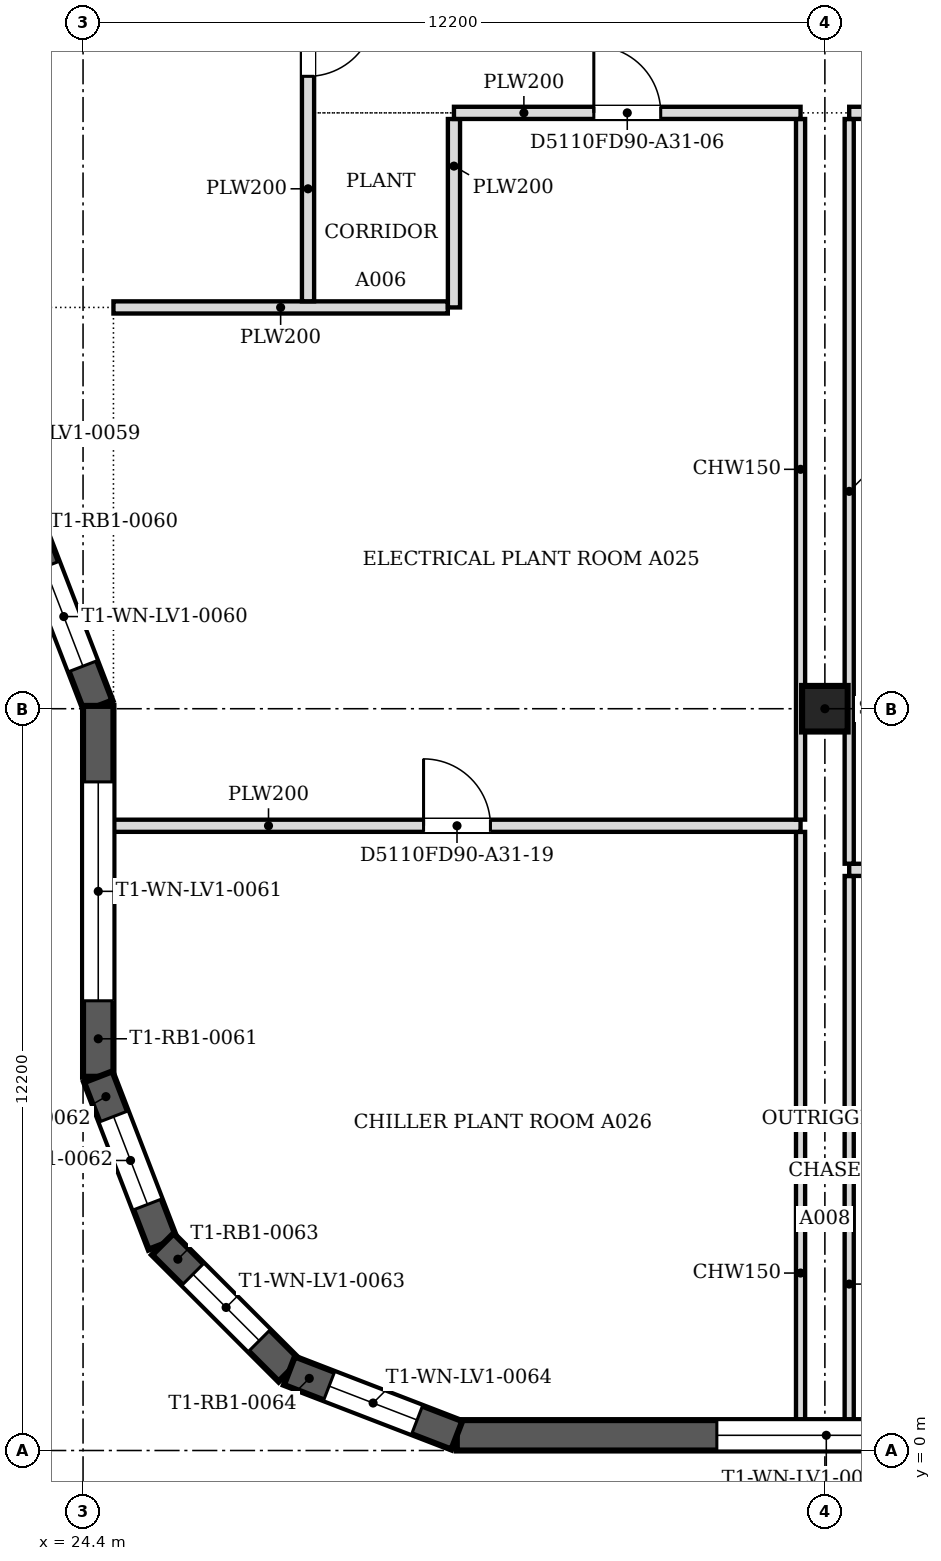
"""IFC4 building model, lengths in metres.
Left out: names, types, materials, properties, quantities, classifications, styles, units other than length and angle.
Written with IfcOpenShell. Run it as: python <this file> out.ifc"""

import sys

from ifc_helpers import new_model, si_unit, direction, frame, frame_2d, origin, origin_2d, place, context, subcontext, project, spatial, polyline, rectangle, outline, extrude, faceted_brep, source, transform, mapped, element, fill, save


model = new_model("IFC4")
c1 = context("Model", 3, precision=1e-05, world=origin(), true_north=direction((0.0, 1.0)))
c2 = subcontext(c1, "Body", "Model", "MODEL_VIEW")
j1 = project(units=[si_unit("LENGTHUNIT", "METRE"), si_unit("PLANEANGLEUNIT", "RADIAN")], contexts=[c1])
p1 = place(None, origin())
s1 = spatial("IfcSite", under=j1, at=p1, CompositionType="ELEMENT")
p2 = place(p1, origin())
s2 = spatial("IfcBuilding", under=s1, at=p2, CompositionType="ELEMENT")
p3 = place(p2, frame((0.0, 0.0, 150.6)))
s3 = spatial("IfcBuildingStorey", under=s2, at=p3, CompositionType="ELEMENT", Elevation=150.6)
p4 = place(p3, frame((36.6, 12.2, 0.0), z_axis=(0.0, 0.0, 1.0), x_axis=(1.0, 0.0, 0.0)))
e1 = element("IfcColumn", 1, at=p4, inside=s3, PredefinedType="COLUMN", context=c2, shape_type="SweptSolid", body=[
    extrude(rectangle(XDim=0.75, YDim=0.75, at=origin_2d()), origin(), (0.0, 0.0, 1.0), 4.6),
])
m1 = source(origin(), c2, "Body", "Brep", [
    faceted_brep([(0.0, -0.25, 0.0), (12.154, -0.25, 0.0), (12.154, -0.25, 4.8), (0.0, -0.25, 4.8), (0.047, 0.25, 4.8), (12.154, 0.25, 4.8), (12.154, 0.25, 0.0), (0.047, 0.25, 0.0), (0.0, 0.0, 0.0), (0.0, 0.0, 4.8)], [[[0, 1, 2, 3]], [[4, 5, 6, 7]], [[7, 6, 1, 0, 8]], [[5, 4, 9, 3, 2]], [[8, 0, 3, 9]], [[7, 8, 9, 4]], [[1, 6, 5, 2]]]),
])
p5 = place(p3, frame((30.547, 0.25, 0.0), z_axis=(0.0, 0.0, 1.0), x_axis=(1.0, 0.0, 0.0)))
e2 = element("IfcWall", 2, at=p5, inside=s3, PredefinedType="SOLIDWALL", context=c2, shape_type="MappedRepresentation", body=[
    mapped(m1, transform((0.0, 0.0, 0.0), scale=1.0)),
])
m2 = source(origin(), c2, "Body", "SweptSolid", [
    extrude(outline(polyline([(4.277, 0.8), (7.877, 0.8), (7.877, 4.0), (4.277, 4.0), (4.277, 0.8)])), frame((0.0, 0.26, 0.0), z_axis=(0.0, -1.0, 0.0), x_axis=(1.0, 0.0, 0.0)), (0.0, 0.0, 1.0), 0.52),
])
p6 = place(p5, origin())
e3 = element("IfcOpeningElement", 3, at=p6, cuts=e2, PredefinedType="OPENING", context=c2, shape_type="MappedRepresentation", body=[
    mapped(m2, transform((0.0, 0.0, 0.0), scale=1.0)),
])
m3 = source(origin(), c2, "Body", "Brep", [
    faceted_brep([(0.053, -0.25, 0.0), (3.103, -0.25, 0.0), (3.103, -0.25, 4.8), (0.053, -0.25, 4.8), (0.0, 0.25, 4.8), (3.149, 0.25, 4.8), (3.149, 0.25, 0.0), (0.0, 0.25, 0.0), (3.149, -0.0, 0.0), (0.0, 0.0, 0.0), (3.149, -0.0, 4.8), (0.0, 0.0, 4.8)], [[[0, 1, 2, 3]], [[4, 5, 6, 7]], [[7, 6, 8, 1, 0, 9]], [[6, 5, 10, 8]], [[5, 4, 11, 3, 2, 10]], [[4, 7, 9, 11]], [[9, 0, 3, 11]], [[1, 8, 10, 2]]]),
])
p7 = place(p3, frame((23.517, 15.185, 0.0), z_axis=(0.0, 0.0, 1.0), x_axis=(0.359841220347, -0.933013556246, 0.0)))
e4 = element("IfcWall", 4, at=p7, inside=s3, PredefinedType="SOLIDWALL", context=c2, shape_type="MappedRepresentation", body=[
    mapped(m3, transform((0.0, 0.0, 0.0), scale=1.0)),
])
m4 = source(origin(), c2, "Body", "SweptSolid", [
    extrude(outline(polyline([(0.7, 0.8), (2.449, 0.8), (2.449, 4.0), (0.7, 4.0), (0.7, 0.8)])), frame((0.0, 0.26, 0.0), z_axis=(0.0, -1.0, 0.0), x_axis=(1.0, 0.0, 0.0)), (0.0, 0.0, 1.0), 0.52),
])
p8 = place(p7, origin())
e5 = element("IfcOpeningElement", 5, at=p8, cuts=e4, PredefinedType="OPENING", context=c2, shape_type="MappedRepresentation", body=[
    mapped(m4, transform((0.0, 0.0, 0.0), scale=1.0)),
])
m5 = source(origin(), c2, "Body", "Brep", [
    faceted_brep([(0.047, -0.25, 0.0), (6.1, -0.25, 0.0), (6.1, -0.25, 4.8), (0.047, -0.25, 4.8), (0.0, 0.25, 4.8), (6.053, 0.25, 4.8), (6.053, 0.25, 0.0), (0.0, 0.25, 0.0), (6.1, -0.0, 0.0), (0.0, 0.0, 0.0), (6.1, -0.0, 4.8), (0.0, 0.0, 4.8)], [[[0, 1, 2, 3]], [[4, 5, 6, 7]], [[7, 6, 8, 1, 0, 9]], [[10, 2, 1, 8]], [[5, 4, 11, 3, 2, 10]], [[4, 7, 9, 11]], [[9, 0, 3, 11]], [[8, 6, 5, 10]]]),
])
p9 = place(p3, frame((24.65, 12.247, 0.0), z_axis=(0.0, 0.0, 1.0), x_axis=(0.0, -1.0, 0.0)))
e6 = element("IfcWall", 6, at=p9, inside=s3, PredefinedType="SOLIDWALL", context=c2, shape_type="MappedRepresentation", body=[
    mapped(m5, transform((0.0, 0.0, 0.0), scale=1.0)),
])
m6 = source(origin(), c2, "Body", "SweptSolid", [
    extrude(outline(polyline([(1.25, 0.8), (4.85, 0.8), (4.85, 4.0), (1.25, 4.0), (1.25, 0.8)])), frame((0.0, 0.26, 0.0), z_axis=(0.0, -1.0, 0.0), x_axis=(1.0, 0.0, 0.0)), (0.0, 0.0, 1.0), 0.52),
])
p10 = place(p9, origin())
e7 = element("IfcOpeningElement", 7, at=p10, cuts=e6, PredefinedType="OPENING", context=c2, shape_type="MappedRepresentation", body=[
    mapped(m6, transform((0.0, 0.0, 0.0), scale=1.0)),
])
m7 = source(origin(), c2, "Body", "Brep", [
    faceted_brep([(0.0, -0.25, 0.0), (2.95, -0.25, 0.0), (2.95, -0.25, 4.8), (0.0, -0.25, 4.8), (0.047, 0.25, 4.8), (2.898, 0.25, 4.8), (2.898, 0.25, 0.0), (0.047, 0.25, 0.0), (2.95, 0.0, 0.0), (0.0, 0.0, 0.0), (2.95, 0.0, 4.8), (0.0, 0.0, 4.8)], [[[0, 1, 2, 3]], [[4, 5, 6, 7]], [[7, 6, 8, 1, 0, 9]], [[10, 2, 1, 8]], [[5, 4, 11, 3, 2, 10]], [[9, 0, 3, 11]], [[7, 9, 11, 4]], [[8, 6, 5, 10]]]),
])
p11 = place(p3, frame((24.65, 6.146, 0.0), z_axis=(0.0, 0.0, 1.0), x_axis=(0.359949242603, -0.932971887438, 0.0)))
e8 = element("IfcWall", 8, at=p11, inside=s3, PredefinedType="SOLIDWALL", context=c2, shape_type="MappedRepresentation", body=[
    mapped(m7, transform((0.0, 0.0, 0.0), scale=1.0)),
])
m8 = source(origin(), c2, "Body", "SweptSolid", [
    extrude(outline(polyline([(0.7, 0.8), (2.25, 0.8), (2.25, 4.0), (0.7, 4.0), (0.7, 0.8)])), frame((0.0, 0.26, 0.0), z_axis=(0.0, -1.0, 0.0), x_axis=(1.0, 0.0, 0.0)), (0.0, 0.0, 1.0), 0.52),
])
p12 = place(p11, origin())
e9 = element("IfcOpeningElement", 9, at=p12, cuts=e8, PredefinedType="OPENING", context=c2, shape_type="MappedRepresentation", body=[
    mapped(m8, transform((0.0, 0.0, 0.0), scale=1.0)),
])
m9 = source(origin(), c2, "Body", "Brep", [
    faceted_brep([(0.0, -0.25, 0.0), (2.944, -0.25, 0.0), (2.944, -0.25, 4.8), (0.0, -0.25, 4.8), (0.053, 0.25, 4.8), (2.891, 0.25, 4.8), (2.891, 0.25, 0.0), (0.053, 0.25, 0.0), (2.944, 0.0, 0.0), (0.0, 0.0, 0.0), (2.944, 0.0, 4.8), (0.0, 0.0, 4.8)], [[[0, 1, 2, 3]], [[4, 5, 6, 7]], [[7, 6, 8, 1, 0, 9]], [[10, 2, 1, 8]], [[5, 4, 11, 3, 2, 10]], [[9, 0, 3, 11]], [[7, 9, 11, 4]], [[8, 6, 5, 10]]]),
])
p13 = place(p3, frame((25.712, 3.394, 0.0), z_axis=(0.0, 0.0, 1.0), x_axis=(0.707106781187, -0.707106781187, 0.0)))
e10 = element("IfcWall", 10, at=p13, inside=s3, PredefinedType="SOLIDWALL", context=c2, shape_type="MappedRepresentation", body=[
    mapped(m9, transform((0.0, 0.0, 0.0), scale=1.0)),
])
m10 = source(origin(), c2, "Body", "SweptSolid", [
    extrude(outline(polyline([(0.7, 0.8), (2.244, 0.8), (2.244, 4.0), (0.7, 4.0), (0.7, 0.8)])), frame((0.0, 0.26, 0.0), z_axis=(0.0, -1.0, 0.0), x_axis=(1.0, 0.0, 0.0)), (0.0, 0.0, 1.0), 0.52),
])
p14 = place(p13, origin())
e11 = element("IfcOpeningElement", 11, at=p14, cuts=e10, PredefinedType="OPENING", context=c2, shape_type="MappedRepresentation", body=[
    mapped(m10, transform((0.0, 0.0, 0.0), scale=1.0)),
])
m11 = source(origin(), c2, "Body", "Brep", [
    faceted_brep([(0.0, -0.25, 0.0), (2.95, -0.25, 0.0), (2.95, -0.25, 4.8), (0.0, -0.25, 4.8), (0.053, 0.25, 4.8), (2.904, 0.25, 4.8), (2.904, 0.25, 0.0), (0.053, 0.25, 0.0), (2.95, 0.0, 0.0), (0.0, 0.0, 0.0), (2.95, 0.0, 4.8), (0.0, 0.0, 4.8)], [[[0, 1, 2, 3]], [[4, 5, 6, 7]], [[7, 6, 8, 1, 0, 9]], [[10, 2, 1, 8]], [[5, 4, 11, 3, 2, 10]], [[9, 0, 3, 11]], [[7, 9, 11, 4]], [[8, 6, 5, 10]]]),
])
p15 = place(p3, frame((27.794, 1.312, 0.0), z_axis=(0.0, 0.0, 1.0), x_axis=(0.932971887438, -0.359949242603, 0.0)))
e12 = element("IfcWall", 12, at=p15, inside=s3, PredefinedType="SOLIDWALL", context=c2, shape_type="MappedRepresentation", body=[
    mapped(m11, transform((0.0, 0.0, 0.0), scale=1.0)),
])
p16 = place(p15, origin())
e13 = element("IfcOpeningElement", 13, at=p16, cuts=e12, PredefinedType="OPENING", context=c2, shape_type="MappedRepresentation", body=[
    mapped(m8, transform((0.0, 0.0, 0.0), scale=1.0)),
])
p17 = place(p3, frame((36.2, 0.5, 0.0), z_axis=(0.0, 0.0, 1.0), x_axis=(0.0, 1.0, 0.0)))
e14 = element("IfcWall", 14, at=p17, inside=s3, PredefinedType="PARTITIONING", context=c2, shape_type="SweptSolid", body=[
    extrude(rectangle(XDim=9.674, YDim=0.15, at=frame_2d((4.837, 0.0))), origin(), (0.0, 0.0, 1.0), 4.067),
])
p18 = place(p3, frame((37.0, 0.5, 0.0), z_axis=(0.0, 0.0, 1.0), x_axis=(0.0, 1.0, 0.0)))
e15 = element("IfcWall", 15, at=p18, inside=s3, PredefinedType="PARTITIONING", context=c2, shape_type="SweptSolid", body=[
    extrude(rectangle(XDim=8.949, YDim=0.15, at=frame_2d((4.475, 0.0))), origin(), (0.0, 0.0, 1.0), 4.067),
])
p19 = place(p3, frame((43.299, 9.55, 0.0), z_axis=(0.0, 0.0, 1.0), x_axis=(-1.0, 0.0, 0.0)))
e16 = element("IfcWall", 16, at=p19, inside=s3, PredefinedType="PARTITIONING", context=c2, shape_type="SweptSolid", body=[
    extrude(rectangle(XDim=6.299, YDim=0.2, at=frame_2d((3.149, 0.0))), origin(), (0.0, 0.0, 1.0), 4.067),
])
m12 = source(origin(), c2, "Body", "SweptSolid", [
    extrude(rectangle(XDim=1.1, YDim=2.1, at=frame_2d((0.55, 1.05))), frame((0.0, 0.11, 0.0), z_axis=(0.0, -1.0, 0.0), x_axis=(1.0, 0.0, 0.0)), (0.0, 0.0, 1.0), 0.22),
])
p20 = place(p19, frame((2.599, 0.0, 0.0)))
e17 = element("IfcOpeningElement", 17, at=p20, cuts=e16, PredefinedType="OPENING", context=c2, shape_type="MappedRepresentation", body=[
    mapped(m12, transform((0.0, 0.0, 0.0), scale=1.0)),
])
p21 = place(p3, frame((37.0, 9.651, 0.0), z_axis=(0.0, 0.0, 1.0), x_axis=(0.0, 1.0, 0.0)))
e18 = element("IfcWall", 18, at=p21, inside=s3, PredefinedType="PARTITIONING", context=c2, shape_type="SweptSolid", body=[
    extrude(rectangle(XDim=12.248, YDim=0.15, at=frame_2d((6.124, 0.0))), origin(), (0.0, 0.0, 1.0), 4.067),
])
p22 = place(p3, frame((36.2, 10.275, 0.0), z_axis=(0.0, 0.0, 1.0), x_axis=(-1.0, 0.0, 0.0)))
e19 = element("IfcWall", 19, at=p22, inside=s3, PredefinedType="PARTITIONING", context=c2, shape_type="SweptSolid", body=[
    extrude(rectangle(XDim=11.3, YDim=0.2, at=frame_2d((5.65, 0.0))), origin(), (0.0, 0.0, 1.0), 4.067),
])
p23 = place(p22, frame((5.1, 0.0, 0.0)))
e20 = element("IfcOpeningElement", 20, at=p23, cuts=e19, PredefinedType="OPENING", context=c2, shape_type="MappedRepresentation", body=[
    mapped(m12, transform((0.0, 0.0, 0.0), scale=1.0)),
])
p24 = place(p3, frame((36.2, 10.376, 0.0), z_axis=(0.0, 0.0, 1.0), x_axis=(0.0, 1.0, 0.0)))
e21 = element("IfcWall", 21, at=p24, inside=s3, PredefinedType="PARTITIONING", context=c2, shape_type="SweptSolid", body=[
    extrude(rectangle(XDim=11.523, YDim=0.15, at=frame_2d((5.761, 0.0))), origin(), (0.0, 0.0, 1.0), 4.067),
])
p25 = place(p3, frame((24.9, 18.8, 0.0), z_axis=(0.0, 0.0, 1.0), x_axis=(1.0, 0.0, 0.0)))
e22 = element("IfcWall", 22, at=p25, inside=s3, PredefinedType="PARTITIONING", context=c2, shape_type="SweptSolid", body=[
    extrude(rectangle(XDim=5.499, YDim=0.2, at=frame_2d((2.75, 0.0))), origin(), (0.0, 0.0, 1.0), 4.067),
])
p26 = place(p3, frame((30.5, 18.8, 0.0), z_axis=(0.0, 0.0, 1.0), x_axis=(0.0, 1.0, 0.0)))
e23 = element("IfcWall", 23, at=p26, inside=s3, PredefinedType="PARTITIONING", context=c2, shape_type="SweptSolid", body=[
    extrude(rectangle(XDim=3.099, YDim=0.2, at=frame_2d((1.549, 0.0))), origin(), (0.0, 0.0, 1.0), 4.067),
])
p27 = place(p3, frame((28.1, 18.901, 0.0), z_axis=(0.0, 0.0, 1.0), x_axis=(0.0, 1.0, 0.0)))
e24 = element("IfcWall", 24, at=p27, inside=s3, PredefinedType="PARTITIONING", context=c2, shape_type="SweptSolid", body=[
    extrude(rectangle(XDim=5.398, YDim=0.2, at=frame_2d((2.699, 0.0))), origin(), (0.0, 0.0, 1.0), 4.067),
])
p28 = place(p27, frame((3.7, 0.0, 0.0)))
e25 = element("IfcOpeningElement", 25, at=p28, cuts=e24, PredefinedType="OPENING", context=c2, shape_type="MappedRepresentation", body=[
    mapped(m12, transform((0.0, 0.0, 0.0), scale=1.0)),
])
p29 = place(p3, frame((36.2, 22.0, 0.0), z_axis=(0.0, 0.0, 1.0), x_axis=(-1.0, 0.0, 0.0)))
e26 = element("IfcWall", 26, at=p29, inside=s3, PredefinedType="PARTITIONING", context=c2, shape_type="SweptSolid", body=[
    extrude(rectangle(XDim=5.7, YDim=0.2, at=frame_2d((2.85, 0.0))), origin(), (0.0, 0.0, 1.0), 4.067),
])
p30 = place(p29, frame((2.3, 0.0, 0.0)))
e27 = element("IfcOpeningElement", 27, at=p30, cuts=e26, PredefinedType="OPENING", context=c2, shape_type="MappedRepresentation", body=[
    mapped(m12, transform((0.0, 0.0, 0.0), scale=1.0)),
])
p31 = place(p3, frame((43.299, 22.0, 0.0), z_axis=(0.0, 0.0, 1.0), x_axis=(-1.0, 0.0, 0.0)))
e28 = element("IfcWall", 28, at=p31, inside=s3, PredefinedType="PARTITIONING", context=c2, shape_type="SweptSolid", body=[
    extrude(rectangle(XDim=6.299, YDim=0.2, at=frame_2d((3.149, 0.0))), origin(), (0.0, 0.0, 1.0), 4.067),
])
p32 = place(p31, frame((2.599, 0.0, 0.0)))
e29 = element("IfcOpeningElement", 29, at=p32, cuts=e28, PredefinedType="OPENING", context=c2, shape_type="MappedRepresentation", body=[
    mapped(m12, transform((0.0, 0.0, 0.0), scale=1.0)),
])
m13 = source(origin(), c2, "Body", "SweptSolid", [
    extrude(outline(polyline([(4.277, 0.8), (7.877, 0.8), (7.877, 4.0), (4.277, 4.0), (4.277, 0.8)])), frame((0.0, 0.03, 0.0), z_axis=(0.0, -1.0, 0.0), x_axis=(1.0, 0.0, 0.0)), (0.0, 0.0, 1.0), 0.06),
])
p33 = place(p6, origin())
e30 = element("IfcWindow", 30, at=p33, inside=s3, PartitioningType="USERDEFINED", PredefinedType="WINDOW", context=c2, shape_type="MappedRepresentation", body=[
    mapped(m13, transform((0.0, 0.0, 0.0), scale=1.0)),
])
fill(e3, e30)
m14 = source(origin(), c2, "Body", "SweptSolid", [
    extrude(outline(polyline([(0.7, 0.8), (2.449, 0.8), (2.449, 4.0), (0.7, 4.0), (0.7, 0.8)])), frame((0.0, 0.03, 0.0), z_axis=(0.0, -1.0, 0.0), x_axis=(1.0, 0.0, 0.0)), (0.0, 0.0, 1.0), 0.06),
])
p34 = place(p8, origin())
e31 = element("IfcWindow", 31, at=p34, inside=s3, PartitioningType="USERDEFINED", PredefinedType="WINDOW", context=c2, shape_type="MappedRepresentation", body=[
    mapped(m14, transform((0.0, 0.0, 0.0), scale=1.0)),
])
fill(e5, e31)
m15 = source(origin(), c2, "Body", "SweptSolid", [
    extrude(outline(polyline([(1.25, 0.8), (4.85, 0.8), (4.85, 4.0), (1.25, 4.0), (1.25, 0.8)])), frame((0.0, 0.03, 0.0), z_axis=(0.0, -1.0, 0.0), x_axis=(1.0, 0.0, 0.0)), (0.0, 0.0, 1.0), 0.06),
])
p35 = place(p10, origin())
e32 = element("IfcWindow", 32, at=p35, inside=s3, PartitioningType="USERDEFINED", PredefinedType="WINDOW", context=c2, shape_type="MappedRepresentation", body=[
    mapped(m15, transform((0.0, 0.0, 0.0), scale=1.0)),
])
fill(e7, e32)
m16 = source(origin(), c2, "Body", "SweptSolid", [
    extrude(outline(polyline([(0.7, 0.8), (2.25, 0.8), (2.25, 4.0), (0.7, 4.0), (0.7, 0.8)])), frame((0.0, 0.03, 0.0), z_axis=(0.0, -1.0, 0.0), x_axis=(1.0, 0.0, 0.0)), (0.0, 0.0, 1.0), 0.06),
])
p36 = place(p12, origin())
e33 = element("IfcWindow", 33, at=p36, inside=s3, PartitioningType="USERDEFINED", PredefinedType="WINDOW", context=c2, shape_type="MappedRepresentation", body=[
    mapped(m16, transform((0.0, 0.0, 0.0), scale=1.0)),
])
fill(e9, e33)
m17 = source(origin(), c2, "Body", "SweptSolid", [
    extrude(outline(polyline([(0.7, 0.8), (2.244, 0.8), (2.244, 4.0), (0.7, 4.0), (0.7, 0.8)])), frame((0.0, 0.03, 0.0), z_axis=(0.0, -1.0, 0.0), x_axis=(1.0, 0.0, 0.0)), (0.0, 0.0, 1.0), 0.06),
])
p37 = place(p14, origin())
e34 = element("IfcWindow", 34, at=p37, inside=s3, PartitioningType="USERDEFINED", PredefinedType="WINDOW", context=c2, shape_type="MappedRepresentation", body=[
    mapped(m17, transform((0.0, 0.0, 0.0), scale=1.0)),
])
fill(e11, e34)
p38 = place(p16, origin())
e35 = element("IfcWindow", 35, at=p38, inside=s3, PartitioningType="USERDEFINED", PredefinedType="WINDOW", context=c2, shape_type="MappedRepresentation", body=[
    mapped(m16, transform((0.0, 0.0, 0.0), scale=1.0)),
])
fill(e13, e35)
m18 = source(origin(), c2, "Body", "SweptSolid", [
    extrude(rectangle(XDim=1.1, YDim=2.1, at=frame_2d((0.55, 1.05))), frame((0.0, 0.025, 0.0), z_axis=(0.0, -1.0, 0.0), x_axis=(1.0, 0.0, 0.0)), (0.0, 0.0, 1.0), 0.05),
])
p39 = place(p28, origin())
e36 = element("IfcDoor", 36, at=p39, inside=s3, OperationType="SINGLE_SWING_RIGHT", PredefinedType="DOOR", context=c2, shape_type="MappedRepresentation", body=[
    mapped(m18, transform((0.0, 0.0, 0.0), scale=1.0)),
])
fill(e25, e36)
p40 = place(p30, origin())
e37 = element("IfcDoor", 37, at=p40, inside=s3, OperationType="SINGLE_SWING_RIGHT", PredefinedType="DOOR", context=c2, shape_type="MappedRepresentation", body=[
    mapped(m18, transform((0.0, 0.0, 0.0), scale=1.0)),
])
fill(e27, e37)
p41 = place(p23, origin())
e38 = element("IfcDoor", 38, at=p41, inside=s3, OperationType="SINGLE_SWING_RIGHT", PredefinedType="DOOR", context=c2, shape_type="MappedRepresentation", body=[
    mapped(m18, transform((0.0, 0.0, 0.0), scale=1.0)),
])
fill(e20, e38)
save(model, sys.argv[1])
